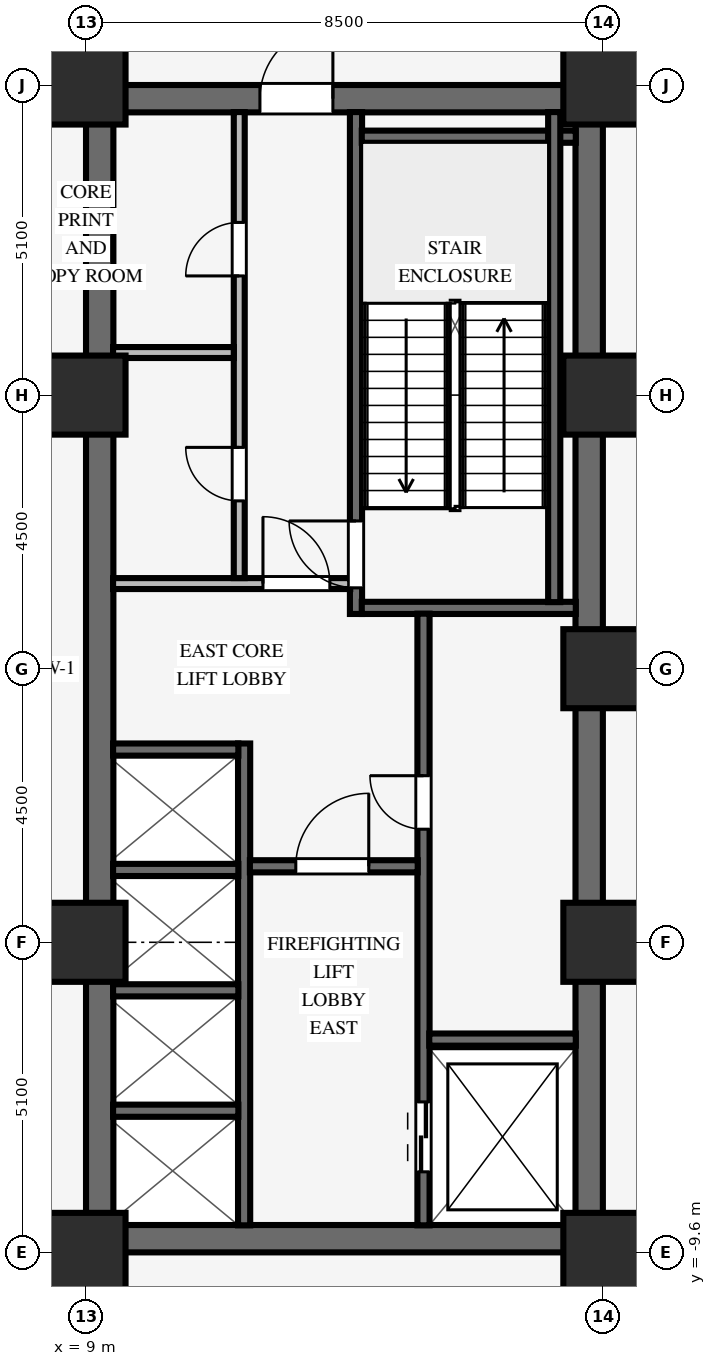
"""IFC4 building model, lengths in metres.
Left out: names, types, materials, properties, quantities, classifications, styles, units other than length and angle.
Written with IfcOpenShell. Run it as: python <this file> out.ifc"""

import sys

from ifc_helpers import new_model, si_unit, direction, frame, frame_2d, origin, origin_2d, place, context, subcontext, project, spatial, rectangle, extrude, source, transform, mapped, element, fill, save


model = new_model("IFC4")
c1 = context("Model", 3, precision=1e-05, world=origin(), true_north=direction((0.0, 1.0)))
c2 = subcontext(c1, "Body", "Model", "MODEL_VIEW")
j1 = project(units=[si_unit("LENGTHUNIT", "METRE"), si_unit("PLANEANGLEUNIT", "RADIAN")], contexts=[c1])
p1 = place(None, origin())
s1 = spatial("IfcSite", under=j1, at=p1, CompositionType="ELEMENT")
p2 = place(p1, origin())
s2 = spatial("IfcBuilding", under=s1, at=p2, CompositionType="ELEMENT")
p3 = place(p2, frame((0.0, 0.0, 9.2)))
s3 = spatial("IfcBuildingStorey", under=s2, at=p3, CompositionType="ELEMENT", Elevation=9.2)
p4 = place(p3, frame((9.0, -9.375, 0.0), z_axis=(0.0, 0.0, 1.0), x_axis=(1.0, 0.0, 0.0)))
e1 = element("IfcWall", 1, at=p4, inside=s3, PredefinedType="SHEAR", context=c2, shape_type="SweptSolid", body=[
    extrude(rectangle(XDim=8.5, YDim=0.45, at=frame_2d((4.25, 0.0))), origin(), (0.0, 0.0, 1.0), 4.28),
])
p5 = place(p3, frame((9.0, 9.375, 0.0), z_axis=(0.0, 0.0, 1.0), x_axis=(1.0, 0.0, 0.0)))
e2 = element("IfcWall", 2, at=p5, inside=s3, PredefinedType="SHEAR", context=c2, shape_type="SweptSolid", body=[
    extrude(rectangle(XDim=8.5, YDim=0.45, at=frame_2d((4.25, 0.0))), origin(), (0.0, 0.0, 1.0), 4.28),
])
p6 = place(p5, frame((2.86, 0.0, 0.0)))
e3 = element("IfcOpeningElement", 3, at=p6, cuts=e2, PredefinedType="OPENING", context=c2, shape_type="SweptSolid", body=[
    extrude(rectangle(XDim=1.2, YDim=2.15, at=frame_2d((0.6, 1.075))), frame((0.0, 0.235, 0.0), z_axis=(0.0, -1.0, 0.0), x_axis=(1.0, 0.0, 0.0)), (0.0, 0.0, 1.0), 0.47),
])
for number, where, z_axis, x_axis in (
    (4, (9.225, -9.155, 0.0), (0.0, 0.0, 1.0), (0.0, 1.0, 0.0)),
    (5, (17.275, -9.155, 0.0), (0.0, 0.0, 1.0), (0.0, 1.0, 0.0)),
):
    element("IfcWall", number, at=place(p3, frame(where, z_axis=z_axis, x_axis=x_axis)), inside=s3, PredefinedType="SHEAR", context=c2, shape_type="SweptSolid", body=[
        extrude(rectangle(XDim=18.31, YDim=0.45, at=frame_2d((9.155, 0.0))), origin(), (0.0, 0.0, 1.0), 4.28),
    ])
for number, where, z_axis, x_axis in (
    (6, (9.0, -9.6, 0.0), (0.0, 0.0, 1.0), (1.0, 0.0, 0.0)),
    (7, (9.0, -4.5, 0.0), (0.0, 0.0, 1.0), (1.0, 0.0, 0.0)),
    (8, (9.0, 4.5, 0.0), (0.0, 0.0, 1.0), (1.0, 0.0, 0.0)),
    (9, (9.0, 9.6, 0.0), (0.0, 0.0, 1.0), (1.0, 0.0, 0.0)),
    (10, (17.5, -9.6, 0.0), (0.0, 0.0, 1.0), (1.0, 0.0, 0.0)),
    (11, (17.5, -4.5, 0.0), (0.0, 0.0, 1.0), (1.0, 0.0, 0.0)),
    (12, (17.5, 4.5, 0.0), (0.0, 0.0, 1.0), (1.0, 0.0, 0.0)),
    (13, (17.5, 9.6, 0.0), (0.0, 0.0, 1.0), (1.0, 0.0, 0.0)),
    (14, (17.5, 0.0, 0.0), (0.0, 0.0, 1.0), (1.0, 0.0, 0.0)),
):
    element("IfcColumn", number, at=place(p3, frame(where, z_axis=z_axis, x_axis=x_axis)), inside=s3, PredefinedType="COLUMN", context=c2, shape_type="SweptSolid", body=[
        extrude(rectangle(XDim=1.3, YDim=1.3, at=origin_2d()), origin(), (0.0, 0.0, 1.0), 4.28),
    ])
p7 = place(p3, frame((13.44, 0.9, 0.0), z_axis=(0.0, 0.0, 1.0), x_axis=(0.0, 1.0, 0.0)))
e15 = element("IfcWall", 15, at=p7, inside=s3, PredefinedType="SHEAR", context=c2, shape_type="SweptSolid", body=[
    extrude(rectangle(XDim=8.255, YDim=0.2, at=frame_2d((4.127, 0.0))), origin(), (0.0, 0.0, 1.0), 4.28),
])
p8 = place(p7, frame((0.43, 0.0, 0.0)))
e16 = element("IfcOpeningElement", 16, at=p8, cuts=e15, PredefinedType="OPENING", context=c2, shape_type="SweptSolid", body=[
    extrude(rectangle(XDim=1.1, YDim=2.15, at=frame_2d((0.55, 1.075))), frame((0.0, 0.11, 0.0), z_axis=(0.0, -1.0, 0.0), x_axis=(1.0, 0.0, 0.0)), (0.0, 0.0, 1.0), 0.22),
])
for number, where, z_axis, x_axis in (
    (17, (13.535, 1.0, 0.0), (0.0, 0.0, 1.0), (1.0, 0.0, 0.0)),
    (18, (13.535, 8.75, 0.0), (0.0, 0.0, 1.0), (1.0, 0.0, 0.0)),
):
    element("IfcWall", number, at=place(p3, frame(where, z_axis=z_axis, x_axis=x_axis)), inside=s3, PredefinedType="SHEAR", context=c2, shape_type="SweptSolid", body=[
        extrude(rectangle(XDim=3.52, YDim=0.2, at=frame_2d((1.76, 0.0))), origin(), (0.0, 0.0, 1.0), 4.28),
    ])
p9 = place(p3, frame((16.7, 1.095, 0.0), z_axis=(0.0, 0.0, 1.0), x_axis=(0.0, 1.0, 0.0)))
e19 = element("IfcWall", 19, at=p9, inside=s3, PredefinedType="SHEAR", context=c2, shape_type="SweptSolid", body=[
    extrude(rectangle(XDim=8.06, YDim=0.2, at=frame_2d((4.03, 0.0))), origin(), (0.0, 0.0, 1.0), 4.28),
])
p10 = place(p3, frame((14.55, -9.155, 0.0), z_axis=(0.0, 0.0, 1.0), x_axis=(0.0, 1.0, 0.0)))
e20 = element("IfcWall", 20, at=p10, inside=s3, PredefinedType="SHEAR", context=c2, shape_type="SweptSolid", body=[
    extrude(rectangle(XDim=10.06, YDim=0.2, at=frame_2d((5.03, 0.0))), origin(), (0.0, 0.0, 1.0), 4.28),
])
p11 = place(p10, frame((6.515, 0.0, 0.0)))
e21 = element("IfcOpeningElement", 21, at=p11, cuts=e20, PredefinedType="OPENING", context=c2, shape_type="SweptSolid", body=[
    extrude(rectangle(XDim=0.88, YDim=2.1, at=frame_2d((0.44, 1.05))), frame((0.0, 0.11, 0.0), z_axis=(0.0, -1.0, 0.0), x_axis=(1.0, 0.0, 0.0)), (0.0, 0.0, 1.0), 0.22),
])
p12 = place(p10, frame((0.88, 0.0, 0.0)))
e22 = element("IfcOpeningElement", 22, at=p12, cuts=e20, PredefinedType="OPENING", context=c2, shape_type="SweptSolid", body=[
    extrude(rectangle(XDim=1.15, YDim=2.15, at=frame_2d((0.575, 1.075))), frame((0.0, 0.11, 0.0), z_axis=(0.0, -1.0, 0.0), x_axis=(1.0, 0.0, 0.0)), (0.0, 0.0, 1.0), 0.22),
])
p13 = place(p3, frame((14.645, -6.1, 0.0), z_axis=(0.0, 0.0, 1.0), x_axis=(1.0, 0.0, 0.0)))
e23 = element("IfcWall", 23, at=p13, inside=s3, PredefinedType="SHEAR", context=c2, shape_type="SweptSolid", body=[
    extrude(rectangle(XDim=2.41, YDim=0.2, at=frame_2d((1.205, 0.0))), origin(), (0.0, 0.0, 1.0), 4.28),
])
p14 = place(p3, frame((11.6, -9.155, 0.0), z_axis=(0.0, 0.0, 1.0), x_axis=(0.0, 1.0, 0.0)))
e24 = element("IfcWall", 24, at=p14, inside=s3, PredefinedType="SHEAR", context=c2, shape_type="SweptSolid", body=[
    extrude(rectangle(XDim=7.925, YDim=0.2, at=frame_2d((3.962, 0.0))), origin(), (0.0, 0.0, 1.0), 4.28),
])
p15 = place(p3, frame((11.695, -3.25, 0.0), z_axis=(0.0, 0.0, 1.0), x_axis=(1.0, 0.0, 0.0)))
e25 = element("IfcWall", 25, at=p15, inside=s3, PredefinedType="SHEAR", context=c2, shape_type="SweptSolid", body=[
    extrude(rectangle(XDim=2.76, YDim=0.2, at=frame_2d((1.38, 0.0))), origin(), (0.0, 0.0, 1.0), 4.28),
])
p16 = place(p15, frame((0.755, 0.0, 0.0)))
e26 = element("IfcOpeningElement", 26, at=p16, cuts=e25, PredefinedType="OPENING", context=c2, shape_type="SweptSolid", body=[
    extrude(rectangle(XDim=1.2, YDim=2.15, at=frame_2d((0.6, 1.075))), frame((0.0, 0.11, 0.0), z_axis=(0.0, -1.0, 0.0), x_axis=(1.0, 0.0, 0.0)), (0.0, 0.0, 1.0), 0.22),
])
for number, where, z_axis, x_axis in (
    (27, (9.445, -7.27, 0.0), (0.0, 0.0, 1.0), (1.0, 0.0, 0.0)),
    (28, (9.445, -5.29, 0.0), (0.0, 0.0, 1.0), (1.0, 0.0, 0.0)),
    (29, (9.445, -3.31, 0.0), (0.0, 0.0, 1.0), (1.0, 0.0, 0.0)),
    (30, (9.445, -1.33, 0.0), (0.0, 0.0, 1.0), (1.0, 0.0, 0.0)),
):
    element("IfcWall", number, at=place(p3, frame(where, z_axis=z_axis, x_axis=x_axis)), inside=s3, PredefinedType="SHEAR", context=c2, shape_type="SweptSolid", body=[
        extrude(rectangle(XDim=2.06, YDim=0.2, at=frame_2d((1.03, 0.0))), origin(), (0.0, 0.0, 1.0), 4.28),
    ])
p17 = place(p3, frame((9.445, 1.4, 0.0), z_axis=(0.0, 0.0, 1.0), x_axis=(1.0, 0.0, 0.0)))
e31 = element("IfcWall", 31, at=p17, inside=s3, PredefinedType="PARTITIONING", context=c2, shape_type="SweptSolid", body=[
    extrude(rectangle(XDim=3.9, YDim=0.18, at=frame_2d((1.95, 0.0))), origin(), (0.0, 0.0, 1.0), 4.27),
])
p18 = place(p17, frame((2.465, 0.0, 0.0)))
e32 = element("IfcOpeningElement", 32, at=p18, cuts=e31, PredefinedType="OPENING", context=c2, shape_type="SweptSolid", body=[
    extrude(rectangle(XDim=1.1, YDim=2.15, at=frame_2d((0.55, 1.075))), frame((0.0, 0.1, 0.0), z_axis=(0.0, -1.0, 0.0), x_axis=(1.0, 0.0, 0.0)), (0.0, 0.0, 1.0), 0.2),
])
p19 = place(p3, frame((11.52, 1.49, 0.0), z_axis=(0.0, 0.0, 1.0), x_axis=(0.0, 1.0, 0.0)))
e33 = element("IfcWall", 33, at=p19, inside=s3, PredefinedType="PARTITIONING", context=c2, shape_type="SweptSolid", body=[
    extrude(rectangle(XDim=7.665, YDim=0.18, at=frame_2d((3.833, 0.0))), origin(), (0.0, 0.0, 1.0), 4.27),
])
p20 = place(p19, frame((1.27, 0.0, 0.0)))
e34 = element("IfcOpeningElement", 34, at=p20, cuts=e33, PredefinedType="OPENING", context=c2, shape_type="SweptSolid", body=[
    extrude(rectangle(XDim=0.88, YDim=2.1, at=frame_2d((0.44, 1.05))), frame((0.0, 0.1, 0.0), z_axis=(0.0, -1.0, 0.0), x_axis=(1.0, 0.0, 0.0)), (0.0, 0.0, 1.0), 0.2),
])
p21 = place(p19, frame((4.97, 0.0, 0.0)))
e35 = element("IfcOpeningElement", 35, at=p21, cuts=e33, PredefinedType="OPENING", context=c2, shape_type="SweptSolid", body=[
    extrude(rectangle(XDim=0.88, YDim=2.1, at=frame_2d((0.44, 1.05))), frame((0.0, 0.1, 0.0), z_axis=(0.0, -1.0, 0.0), x_axis=(1.0, 0.0, 0.0)), (0.0, 0.0, 1.0), 0.2),
])
p22 = place(p3, frame((9.445, 5.2, 0.0), z_axis=(0.0, 0.0, 1.0), x_axis=(1.0, 0.0, 0.0)))
e36 = element("IfcWall", 36, at=p22, inside=s3, PredefinedType="PARTITIONING", context=c2, shape_type="SweptSolid", body=[
    extrude(rectangle(XDim=1.985, YDim=0.18, at=frame_2d((0.992, 0.0))), origin(), (0.0, 0.0, 1.0), 4.27),
])
m1 = source(origin(), c2, "Body", "SweptSolid", [
    extrude(rectangle(XDim=1.1, YDim=2.15, at=frame_2d((0.55, 1.075))), frame((0.0, 0.025, 0.0), z_axis=(0.0, -1.0, 0.0), x_axis=(1.0, 0.0, 0.0)), (0.0, 0.0, 1.0), 0.05),
])
p23 = place(p8, origin())
e37 = element("IfcDoor", 37, at=p23, inside=s3, OperationType="SINGLE_SWING_RIGHT", PredefinedType="DOOR", context=c2, shape_type="MappedRepresentation", body=[
    mapped(m1, transform((0.0, 0.0, 0.0), scale=1.0)),
])
fill(e16, e37)
m2 = source(origin(), c2, "Body", "SweptSolid", [
    extrude(rectangle(XDim=0.88, YDim=2.1, at=frame_2d((0.44, 1.05))), frame((0.0, 0.025, 0.0), z_axis=(0.0, -1.0, 0.0), x_axis=(1.0, 0.0, 0.0)), (0.0, 0.0, 1.0), 0.05),
])
p24 = place(p11, origin())
e38 = element("IfcDoor", 38, at=p24, inside=s3, OperationType="SINGLE_SWING_RIGHT", PredefinedType="DOOR", context=c2, shape_type="MappedRepresentation", body=[
    mapped(m2, transform((0.0, 0.0, 0.0), scale=1.0)),
])
fill(e21, e38)
m3 = source(origin(), c2, "Body", "SweptSolid", [
    extrude(rectangle(XDim=1.2, YDim=2.15, at=frame_2d((0.6, 1.075))), frame((0.0, 0.025, 0.0), z_axis=(0.0, -1.0, 0.0), x_axis=(1.0, 0.0, 0.0)), (0.0, 0.0, 1.0), 0.05),
])
p25 = place(p16, origin())
e39 = element("IfcDoor", 39, at=p25, inside=s3, OperationType="SINGLE_SWING_RIGHT", PredefinedType="DOOR", context=c2, shape_type="MappedRepresentation", body=[
    mapped(m3, transform((0.0, 0.0, 0.0), scale=1.0)),
])
fill(e26, e39)
p26 = place(p6, origin())
e40 = element("IfcDoor", 40, at=p26, inside=s3, OperationType="SINGLE_SWING_RIGHT", PredefinedType="DOOR", context=c2, shape_type="MappedRepresentation", body=[
    mapped(m3, transform((0.0, 0.0, 0.0), scale=1.0)),
])
fill(e3, e40)
p27 = place(p18, origin())
e41 = element("IfcDoor", 41, at=p27, inside=s3, OperationType="SINGLE_SWING_LEFT", PredefinedType="DOOR", context=c2, shape_type="MappedRepresentation", body=[
    mapped(m1, transform((0.0, 0.0, 0.0), scale=1.0)),
])
fill(e32, e41)
p28 = place(p20, origin())
e42 = element("IfcDoor", 42, at=p28, inside=s3, OperationType="SINGLE_SWING_RIGHT", PredefinedType="DOOR", context=c2, shape_type="MappedRepresentation", body=[
    mapped(m2, transform((0.0, 0.0, 0.0), scale=1.0)),
])
fill(e34, e42)
p29 = place(p21, origin())
e43 = element("IfcDoor", 43, at=p29, inside=s3, OperationType="SINGLE_SWING_LEFT", PredefinedType="DOOR", context=c2, shape_type="MappedRepresentation", body=[
    mapped(m2, transform((0.0, 0.0, 0.0), scale=1.0)),
])
fill(e35, e43)
m4 = source(origin(), c2, "Body", "SweptSolid", [
    extrude(rectangle(XDim=1.15, YDim=2.15, at=frame_2d((0.575, 1.075))), frame((0.0, 0.025, 0.0), z_axis=(0.0, -1.0, 0.0), x_axis=(1.0, 0.0, 0.0)), (0.0, 0.0, 1.0), 0.05),
])
p30 = place(p12, origin())
e44 = element("IfcDoor", 44, at=p30, inside=s3, OperationType="DOUBLE_DOOR_SLIDING", PredefinedType="DOOR", context=c2, shape_type="MappedRepresentation", body=[
    mapped(m4, transform((0.0, 0.0, 0.0), scale=1.0)),
])
fill(e22, e44)
save(model, sys.argv[1])
